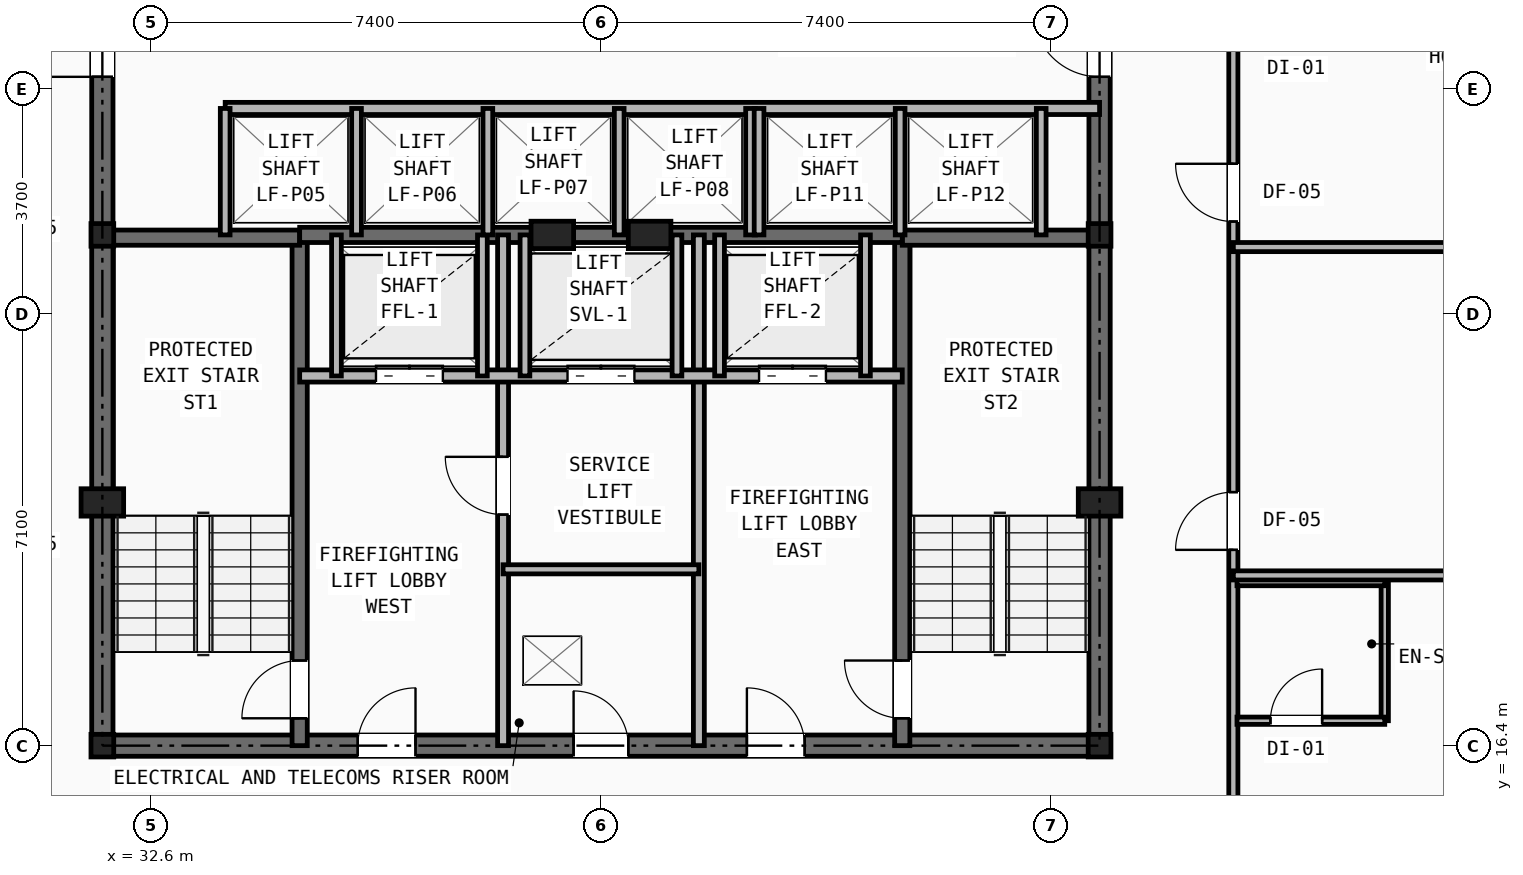
"""IFC4 building model, lengths in metres.
Left out: names, types, materials, properties, quantities, classifications, styles, units other than length and angle.
Written with IfcOpenShell. Run it as: python <this file> out.ifc"""

import sys

from ifc_helpers import new_model, si_unit, direction, frame, frame_2d, origin, origin_2d, place, context, subcontext, project, spatial, rectangle, i_section, extrude, element, fill, save


model = new_model("IFC4")
c1 = context("Model", 3, precision=1e-05, world=origin(), true_north=direction((0.0, 1.0)))
c2 = subcontext(c1, "Body", "Model", "MODEL_VIEW")
j1 = project(units=[si_unit("LENGTHUNIT", "METRE"), si_unit("PLANEANGLEUNIT", "RADIAN")], contexts=[c1])
p1 = place(None, origin())
s1 = spatial("IfcSite", under=j1, at=p1, CompositionType="ELEMENT")
p2 = place(p1, origin())
s2 = spatial("IfcBuilding", under=s1, at=p2, CompositionType="ELEMENT")
p3 = place(p2, frame((0.0, 0.0, 102.2)))
s3 = spatial("IfcBuildingStorey", under=s2, at=p3, CompositionType="ELEMENT", Elevation=102.2)
for number, where, z_axis, x_axis in (
    (1, (31.8, 16.4, 0.0), (0.0, 0.0, 1.0), (1.0, 0.0, 0.0)),
    (2, (48.2, 16.4, 0.0), (0.0, 0.0, 1.0), (1.0, 0.0, 0.0)),
    (3, (31.8, 24.8, 0.0), (0.0, 0.0, 1.0), (1.0, 0.0, 0.0)),
    (4, (48.2, 24.8, 0.0), (0.0, 0.0, 1.0), (1.0, 0.0, 0.0)),
):
    element("IfcColumn", number, at=place(p3, frame(where, z_axis=z_axis, x_axis=x_axis)), inside=s3, PredefinedType="COLUMN", context=c2, shape_type="SweptSolid", body=[
        extrude(i_section(OverallWidth=0.374, OverallDepth=0.372, WebThickness=0.016, FlangeThickness=0.026, at=origin_2d()), origin(), (0.0, 0.0, 1.0), 3.2),
    ])
for number, where, z_axis, x_axis in (
    (5, (31.8, 20.4, 0.0), (0.0, 0.0, 1.0), (1.0, 0.0, 0.0)),
    (6, (48.2, 20.4, 0.0), (0.0, 0.0, 1.0), (1.0, 0.0, 0.0)),
    (7, (39.2, 24.8, 0.0), (0.0, 0.0, 1.0), (1.0, 0.0, 0.0)),
    (8, (40.8, 24.8, 0.0), (0.0, 0.0, 1.0), (1.0, 0.0, 0.0)),
):
    element("IfcColumn", number, at=place(p3, frame(where, z_axis=z_axis, x_axis=x_axis)), inside=s3, PredefinedType="PILASTER", context=c2, shape_type="SweptSolid", body=[
        extrude(rectangle(XDim=0.7, YDim=0.45, at=origin_2d()), origin(), (0.0, 0.0, 1.0), 3.2),
    ])
p4 = place(p3, frame((31.8, 16.4, 0.0), z_axis=(0.0, 0.0, 1.0), x_axis=(1.0, 0.0, 0.0)))
e9 = element("IfcWall", 9, at=p4, inside=s3, PredefinedType="SHEAR", context=c2, shape_type="SweptSolid", body=[
    extrude(rectangle(XDim=16.4, YDim=0.35, at=frame_2d((8.2, 0.0))), origin(), (0.0, 0.0, 1.0), 2.97),
])
p5 = place(p4, frame((7.75, 0.0, 0.0)))
e10 = element("IfcOpeningElement", 10, at=p5, cuts=e9, PredefinedType="OPENING", context=c2, shape_type="SweptSolid", body=[
    extrude(rectangle(XDim=0.9, YDim=2.1, at=frame_2d((0.45, 1.05))), frame((0.0, 0.185, 0.0), z_axis=(0.0, -1.0, 0.0), x_axis=(1.0, 0.0, 0.0)), (0.0, 0.0, 1.0), 0.37),
])
p6 = place(p4, frame((4.2, 0.0, 0.0)))
e11 = element("IfcOpeningElement", 11, at=p6, cuts=e9, PredefinedType="OPENING", context=c2, shape_type="SweptSolid", body=[
    extrude(rectangle(XDim=0.95, YDim=2.1, at=frame_2d((0.475, 1.05))), frame((0.0, 0.185, 0.0), z_axis=(0.0, -1.0, 0.0), x_axis=(1.0, 0.0, 0.0)), (0.0, 0.0, 1.0), 0.37),
])
p7 = place(p4, frame((10.6, 0.0, 0.0)))
e12 = element("IfcOpeningElement", 12, at=p7, cuts=e9, PredefinedType="OPENING", context=c2, shape_type="SweptSolid", body=[
    extrude(rectangle(XDim=0.95, YDim=2.1, at=frame_2d((0.475, 1.05))), frame((0.0, 0.185, 0.0), z_axis=(0.0, -1.0, 0.0), x_axis=(1.0, 0.0, 0.0)), (0.0, 0.0, 1.0), 0.37),
])
p8 = place(p3, frame((31.8, 16.4, 0.0), z_axis=(0.0, 0.0, 1.0), x_axis=(0.0, 1.0, 0.0)))
e13 = element("IfcWall", 13, at=p8, inside=s3, PredefinedType="SHEAR", context=c2, shape_type="SweptSolid", body=[
    extrude(rectangle(XDim=14.8, YDim=0.35, at=frame_2d((7.4, 0.0))), origin(), (0.0, 0.0, 1.0), 2.97),
])
p9 = place(p8, frame((11.0, 0.0, 0.0)))
e14 = element("IfcOpeningElement", 14, at=p9, cuts=e13, PredefinedType="OPENING", context=c2, shape_type="SweptSolid", body=[
    extrude(rectangle(XDim=1.1, YDim=2.15, at=frame_2d((0.55, 1.075))), frame((0.0, 0.185, 0.0), z_axis=(0.0, -1.0, 0.0), x_axis=(1.0, 0.0, 0.0)), (0.0, 0.0, 1.0), 0.37),
])
p10 = place(p3, frame((48.2, 16.4, 0.0), z_axis=(0.0, 0.0, 1.0), x_axis=(0.0, 1.0, 0.0)))
e15 = element("IfcWall", 15, at=p10, inside=s3, PredefinedType="SHEAR", context=c2, shape_type="SweptSolid", body=[
    extrude(rectangle(XDim=14.8, YDim=0.35, at=frame_2d((7.4, 0.0))), origin(), (0.0, 0.0, 1.0), 2.97),
])
p11 = place(p10, frame((11.0, 0.0, 0.0)))
e16 = element("IfcOpeningElement", 16, at=p11, cuts=e15, PredefinedType="OPENING", context=c2, shape_type="SweptSolid", body=[
    extrude(rectangle(XDim=1.1, YDim=2.15, at=frame_2d((0.55, 1.075))), frame((0.0, 0.185, 0.0), z_axis=(0.0, -1.0, 0.0), x_axis=(1.0, 0.0, 0.0)), (0.0, 0.0, 1.0), 0.37),
])
p12 = place(p3, frame((35.045, 16.4, 0.0), z_axis=(0.0, 0.0, 1.0), x_axis=(0.0, 1.0, 0.0)))
e17 = element("IfcWall", 17, at=p12, inside=s3, PredefinedType="SHEAR", context=c2, shape_type="SweptSolid", body=[
    extrude(rectangle(XDim=8.4, YDim=0.25, at=frame_2d((4.2, 0.0))), origin(), (0.0, 0.0, 1.0), 2.97),
])
p13 = place(p12, frame((0.45, 0.0, 0.0)))
e18 = element("IfcOpeningElement", 18, at=p13, cuts=e17, PredefinedType="OPENING", context=c2, shape_type="SweptSolid", body=[
    extrude(rectangle(XDim=0.95, YDim=2.1, at=frame_2d((0.475, 1.05))), frame((0.0, 0.135, 0.0), z_axis=(0.0, -1.0, 0.0), x_axis=(1.0, 0.0, 0.0)), (0.0, 0.0, 1.0), 0.27),
])
p14 = place(p3, frame((31.8, 24.755, 0.0), z_axis=(0.0, 0.0, 1.0), x_axis=(1.0, 0.0, 0.0)))
e19 = element("IfcWall", 19, at=p14, inside=s3, PredefinedType="SHEAR", context=c2, shape_type="SweptSolid", body=[
    extrude(rectangle(XDim=3.245, YDim=0.25, at=frame_2d((1.623, 0.0))), origin(), (0.0, 0.0, 1.0), 2.97),
])
p15 = place(p3, frame((44.955, 16.4, 0.0), z_axis=(0.0, 0.0, 1.0), x_axis=(0.0, 1.0, 0.0)))
e20 = element("IfcWall", 20, at=p15, inside=s3, PredefinedType="SHEAR", context=c2, shape_type="SweptSolid", body=[
    extrude(rectangle(XDim=8.4, YDim=0.25, at=frame_2d((4.2, 0.0))), origin(), (0.0, 0.0, 1.0), 2.97),
])
p16 = place(p15, frame((0.45, 0.0, 0.0)))
e21 = element("IfcOpeningElement", 21, at=p16, cuts=e20, PredefinedType="OPENING", context=c2, shape_type="SweptSolid", body=[
    extrude(rectangle(XDim=0.95, YDim=2.1, at=frame_2d((0.475, 1.05))), frame((0.0, 0.135, 0.0), z_axis=(0.0, -1.0, 0.0), x_axis=(1.0, 0.0, 0.0)), (0.0, 0.0, 1.0), 0.27),
])
p17 = place(p3, frame((44.955, 24.755, 0.0), z_axis=(0.0, 0.0, 1.0), x_axis=(1.0, 0.0, 0.0)))
e22 = element("IfcWall", 22, at=p17, inside=s3, PredefinedType="SHEAR", context=c2, shape_type="SweptSolid", body=[
    extrude(rectangle(XDim=3.245, YDim=0.25, at=frame_2d((1.623, 0.0))), origin(), (0.0, 0.0, 1.0), 2.97),
])
p18 = place(p3, frame((35.045, 24.8, 0.0), z_axis=(0.0, 0.0, 1.0), x_axis=(1.0, 0.0, 0.0)))
e23 = element("IfcWall", 23, at=p18, inside=s3, PredefinedType="SHEAR", context=c2, shape_type="SweptSolid", body=[
    extrude(rectangle(XDim=9.91, YDim=0.25, at=frame_2d((4.955, 0.0))), origin(), (0.0, 0.0, 1.0), 2.97),
])
p19 = place(p3, frame((38.39, 16.4, 0.0), z_axis=(0.0, 0.0, 1.0), x_axis=(0.0, 1.0, 0.0)))
e24 = element("IfcWall", 24, at=p19, inside=s3, PredefinedType="PARTITIONING", context=c2, shape_type="SweptSolid", body=[
    extrude(rectangle(XDim=8.4, YDim=0.18, at=frame_2d((4.2, 0.0))), origin(), (0.0, 0.0, 1.0), 2.421),
])
p20 = place(p19, frame((3.8, 0.0, 0.0)))
e25 = element("IfcOpeningElement", 25, at=p20, cuts=e24, PredefinedType="OPENING", context=c2, shape_type="SweptSolid", body=[
    extrude(rectangle(XDim=0.95, YDim=2.1, at=frame_2d((0.475, 1.05))), frame((0.0, 0.1, 0.0), z_axis=(0.0, -1.0, 0.0), x_axis=(1.0, 0.0, 0.0)), (0.0, 0.0, 1.0), 0.2),
])
p21 = place(p3, frame((41.61, 16.4, 0.0), z_axis=(0.0, 0.0, 1.0), x_axis=(0.0, 1.0, 0.0)))
e26 = element("IfcWall", 26, at=p21, inside=s3, PredefinedType="PARTITIONING", context=c2, shape_type="SweptSolid", body=[
    extrude(rectangle(XDim=8.4, YDim=0.18, at=frame_2d((4.2, 0.0))), origin(), (0.0, 0.0, 1.0), 2.421),
])
p22 = place(p3, frame((35.045, 22.48, 0.0), z_axis=(0.0, 0.0, 1.0), x_axis=(1.0, 0.0, 0.0)))
e27 = element("IfcWall", 27, at=p22, inside=s3, PredefinedType="SOLIDWALL", context=c2, shape_type="SweptSolid", body=[
    extrude(rectangle(XDim=9.91, YDim=0.2, at=frame_2d((4.955, 0.0))), origin(), (0.0, 0.0, 1.0), 2.97),
])
p23 = place(p22, frame((1.255, 0.0, 0.0)))
e28 = element("IfcOpeningElement", 28, at=p23, cuts=e27, PredefinedType="OPENING", context=c2, shape_type="SweptSolid", body=[
    extrude(rectangle(XDim=1.1, YDim=2.15, at=frame_2d((0.55, 1.075))), frame((0.0, 0.11, 0.0), z_axis=(0.0, -1.0, 0.0), x_axis=(1.0, 0.0, 0.0)), (0.0, 0.0, 1.0), 0.22),
])
p24 = place(p22, frame((7.555, 0.0, 0.0)))
e29 = element("IfcOpeningElement", 29, at=p24, cuts=e27, PredefinedType="OPENING", context=c2, shape_type="SweptSolid", body=[
    extrude(rectangle(XDim=1.1, YDim=2.15, at=frame_2d((0.55, 1.075))), frame((0.0, 0.11, 0.0), z_axis=(0.0, -1.0, 0.0), x_axis=(1.0, 0.0, 0.0)), (0.0, 0.0, 1.0), 0.22),
])
p25 = place(p22, frame((4.405, 0.0, 0.0)))
e30 = element("IfcOpeningElement", 30, at=p25, cuts=e27, PredefinedType="OPENING", context=c2, shape_type="SweptSolid", body=[
    extrude(rectangle(XDim=1.1, YDim=2.15, at=frame_2d((0.55, 1.075))), frame((0.0, 0.11, 0.0), z_axis=(0.0, -1.0, 0.0), x_axis=(1.0, 0.0, 0.0)), (0.0, 0.0, 1.0), 0.22),
])
p26 = place(p3, frame((38.39, 19.3, 0.0), z_axis=(0.0, 0.0, 1.0), x_axis=(1.0, 0.0, 0.0)))
e31 = element("IfcWall", 31, at=p26, inside=s3, PredefinedType="PARTITIONING", context=c2, shape_type="SweptSolid", body=[
    extrude(rectangle(XDim=3.22, YDim=0.15, at=frame_2d((1.61, 0.0))), origin(), (0.0, 0.0, 1.0), 2.97),
])
for number, where, z_axis, x_axis in (
    (32, (35.65, 22.48, 0.0), (0.0, 0.0, 1.0), (0.0, 1.0, 0.0)),
    (33, (38.05, 22.48, 0.0), (0.0, 0.0, 1.0), (0.0, 1.0, 0.0)),
    (34, (41.95, 22.48, 0.0), (0.0, 0.0, 1.0), (0.0, 1.0, 0.0)),
    (35, (44.35, 22.48, 0.0), (0.0, 0.0, 1.0), (0.0, 1.0, 0.0)),
    (36, (38.75, 22.48, 0.0), (0.0, 0.0, 1.0), (0.0, 1.0, 0.0)),
    (37, (41.25, 22.48, 0.0), (0.0, 0.0, 1.0), (0.0, 1.0, 0.0)),
):
    element("IfcWall", number, at=place(p3, frame(where, z_axis=z_axis, x_axis=x_axis)), inside=s3, PredefinedType="SOLIDWALL", context=c2, shape_type="SweptSolid", body=[
        extrude(rectangle(XDim=2.32, YDim=0.16, at=frame_2d((1.16, 0.0))), origin(), (0.0, 0.0, 1.0), 2.97),
    ])
p27 = place(p3, frame((33.82, 26.88, 0.0), z_axis=(0.0, 0.0, 1.0), x_axis=(1.0, 0.0, 0.0)))
e38 = element("IfcWall", 38, at=p27, inside=s3, PredefinedType="SOLIDWALL", context=c2, shape_type="SweptSolid", body=[
    extrude(rectangle(XDim=14.38, YDim=0.2, at=frame_2d((7.19, 0.0))), origin(), (0.0, 0.0, 1.0), 2.421),
])
for number, where, z_axis, x_axis in (
    (39, (33.82, 24.8, 0.0), (0.0, 0.0, 1.0), (0.0, 1.0, 0.0)),
    (40, (35.98, 24.8, 0.0), (0.0, 0.0, 1.0), (0.0, 1.0, 0.0)),
    (41, (38.14, 24.8, 0.0), (0.0, 0.0, 1.0), (0.0, 1.0, 0.0)),
    (42, (40.3, 24.8, 0.0), (0.0, 0.0, 1.0), (0.0, 1.0, 0.0)),
    (43, (42.46, 24.8, 0.0), (0.0, 0.0, 1.0), (0.0, 1.0, 0.0)),
    (44, (42.6, 24.8, 0.0), (0.0, 0.0, 1.0), (0.0, 1.0, 0.0)),
    (45, (44.92, 24.8, 0.0), (0.0, 0.0, 1.0), (0.0, 1.0, 0.0)),
    (46, (47.24, 24.8, 0.0), (0.0, 0.0, 1.0), (0.0, 1.0, 0.0)),
):
    element("IfcWall", number, at=place(p3, frame(where, z_axis=z_axis, x_axis=x_axis)), inside=s3, PredefinedType="SOLIDWALL", context=c2, shape_type="SweptSolid", body=[
        extrude(rectangle(XDim=2.08, YDim=0.16, at=frame_2d((1.04, 0.0))), origin(), (0.0, 0.0, 1.0), 2.97),
    ])
p28 = place(p3, frame((50.4, 14.1, 0.0), z_axis=(0.0, 0.0, 1.0), x_axis=(0.0, 1.0, 0.0)))
e47 = element("IfcWall", 47, at=p28, inside=s3, PredefinedType="PARTITIONING", context=c2, shape_type="SweptSolid", body=[
    extrude(rectangle(XDim=21.9, YDim=0.15, at=frame_2d((10.95, 0.0))), origin(), (0.0, 0.0, 1.0), 2.421),
])
p29 = place(p28, frame((0.42, 0.0, 0.0)))
e48 = element("IfcOpeningElement", 48, at=p29, cuts=e47, PredefinedType="OPENING", context=c2, shape_type="SweptSolid", body=[
    extrude(rectangle(XDim=0.95, YDim=2.1, at=frame_2d((0.475, 1.05))), frame((0.0, 0.085, 0.0), z_axis=(0.0, -1.0, 0.0), x_axis=(1.0, 0.0, 0.0)), (0.0, 0.0, 1.0), 0.17),
])
p30 = place(p28, frame((5.52, 0.0, 0.0)))
e49 = element("IfcOpeningElement", 49, at=p30, cuts=e47, PredefinedType="OPENING", context=c2, shape_type="SweptSolid", body=[
    extrude(rectangle(XDim=0.95, YDim=2.1, at=frame_2d((0.475, 1.05))), frame((0.0, 0.085, 0.0), z_axis=(0.0, -1.0, 0.0), x_axis=(1.0, 0.0, 0.0)), (0.0, 0.0, 1.0), 0.17),
])
p31 = place(p28, frame((10.92, 0.0, 0.0)))
e50 = element("IfcOpeningElement", 50, at=p31, cuts=e47, PredefinedType="OPENING", context=c2, shape_type="SweptSolid", body=[
    extrude(rectangle(XDim=0.95, YDim=2.1, at=frame_2d((0.475, 1.05))), frame((0.0, 0.085, 0.0), z_axis=(0.0, -1.0, 0.0), x_axis=(1.0, 0.0, 0.0)), (0.0, 0.0, 1.0), 0.17),
])
p32 = place(p28, frame((16.72, 0.0, 0.0)))
e51 = element("IfcOpeningElement", 51, at=p32, cuts=e47, PredefinedType="OPENING", context=c2, shape_type="SweptSolid", body=[
    extrude(rectangle(XDim=0.95, YDim=2.1, at=frame_2d((0.475, 1.05))), frame((0.0, 0.085, 0.0), z_axis=(0.0, -1.0, 0.0), x_axis=(1.0, 0.0, 0.0)), (0.0, 0.0, 1.0), 0.17),
])
p33 = place(p3, frame((52.89, 16.81, 0.0), z_axis=(0.0, 0.0, 1.0), x_axis=(0.0, 1.0, 0.0)))
e52 = element("IfcWall", 52, at=p33, inside=s3, PredefinedType="PARTITIONING", context=c2, shape_type="SweptSolid", body=[
    extrude(rectangle(XDim=2.28, YDim=0.12, at=frame_2d((1.14, 0.0))), origin(), (0.0, 0.0, 1.0), 2.97),
])
p34 = place(p3, frame((50.46, 16.81, 0.0), z_axis=(0.0, 0.0, 1.0), x_axis=(1.0, 0.0, 0.0)))
e53 = element("IfcWall", 53, at=p34, inside=s3, PredefinedType="PARTITIONING", context=c2, shape_type="SweptSolid", body=[
    extrude(rectangle(XDim=2.43, YDim=0.12, at=frame_2d((1.215, 0.0))), origin(), (0.0, 0.0, 1.0), 2.97),
])
p35 = place(p34, frame((0.55, 0.0, 0.0)))
e54 = element("IfcOpeningElement", 54, at=p35, cuts=e53, PredefinedType="OPENING", context=c2, shape_type="SweptSolid", body=[
    extrude(rectangle(XDim=0.85, YDim=2.05, at=frame_2d((0.425, 1.025))), frame((0.0, 0.07, 0.0), z_axis=(0.0, -1.0, 0.0), x_axis=(1.0, 0.0, 0.0)), (0.0, 0.0, 1.0), 0.14),
])
p36 = place(p3, frame((50.46, 19.09, 0.0), z_axis=(0.0, 0.0, 1.0), x_axis=(1.0, 0.0, 0.0)))
e55 = element("IfcWall", 55, at=p36, inside=s3, PredefinedType="PARTITIONING", context=c2, shape_type="SweptSolid", body=[
    extrude(rectangle(XDim=2.43, YDim=0.12, at=frame_2d((1.215, 0.0))), origin(), (0.0, 0.0, 1.0), 2.97),
])
p37 = place(p3, frame((50.4, 19.2, 0.0), z_axis=(0.0, 0.0, 1.0), x_axis=(1.0, 0.0, 0.0)))
e56 = element("IfcWall", 56, at=p37, inside=s3, PredefinedType="PARTITIONING", context=c2, shape_type="SweptSolid", body=[
    extrude(rectangle(XDim=14.218, YDim=0.15, at=frame_2d((7.109, 0.0))), origin(), (0.0, 0.0, 1.0), 2.258),
])
p38 = place(p3, frame((50.4, 24.6, 0.0), z_axis=(0.0, 0.0, 1.0), x_axis=(1.0, 0.0, 0.0)))
e57 = element("IfcWall", 57, at=p38, inside=s3, PredefinedType="PARTITIONING", context=c2, shape_type="SweptSolid", body=[
    extrude(rectangle(XDim=11.295, YDim=0.15, at=frame_2d((5.648, 0.0))), origin(), (0.0, 0.0, 1.0), 2.258),
])
p39 = place(p5, origin())
e58 = element("IfcDoor", 58, at=p39, inside=s3, OperationType="SINGLE_SWING_LEFT", PredefinedType="DOOR", context=c2, shape_type="SweptSolid", body=[
    extrude(rectangle(XDim=0.9, YDim=2.1, at=frame_2d((0.45, 1.05))), frame((0.0, 0.025, 0.0), z_axis=(0.0, -1.0, 0.0), x_axis=(1.0, 0.0, 0.0)), (0.0, 0.0, 1.0), 0.05),
])
fill(e10, e58)
p40 = place(p20, origin())
e59 = element("IfcDoor", 59, at=p40, inside=s3, OperationType="SINGLE_SWING_RIGHT", PredefinedType="DOOR", context=c2, shape_type="SweptSolid", body=[
    extrude(rectangle(XDim=0.95, YDim=2.1, at=frame_2d((0.475, 1.05))), frame((0.0, 0.025, 0.0), z_axis=(0.0, -1.0, 0.0), x_axis=(1.0, 0.0, 0.0)), (0.0, 0.0, 1.0), 0.05),
])
fill(e25, e59)
p41 = place(p13, origin())
e60 = element("IfcDoor", 60, at=p41, inside=s3, OperationType="SINGLE_SWING_LEFT", PredefinedType="DOOR", context=c2, shape_type="SweptSolid", body=[
    extrude(rectangle(XDim=0.95, YDim=2.1, at=frame_2d((0.475, 1.05))), frame((0.0, 0.025, 0.0), z_axis=(0.0, -1.0, 0.0), x_axis=(1.0, 0.0, 0.0)), (0.0, 0.0, 1.0), 0.05),
])
fill(e18, e60)
p42 = place(p16, origin())
e61 = element("IfcDoor", 61, at=p42, inside=s3, OperationType="SINGLE_SWING_RIGHT", PredefinedType="DOOR", context=c2, shape_type="SweptSolid", body=[
    extrude(rectangle(XDim=0.95, YDim=2.1, at=frame_2d((0.475, 1.05))), frame((0.0, 0.025, 0.0), z_axis=(0.0, -1.0, 0.0), x_axis=(1.0, 0.0, 0.0)), (0.0, 0.0, 1.0), 0.05),
])
fill(e21, e61)
p43 = place(p6, origin())
e62 = element("IfcDoor", 62, at=p43, inside=s3, OperationType="SINGLE_SWING_RIGHT", PredefinedType="DOOR", context=c2, shape_type="SweptSolid", body=[
    extrude(rectangle(XDim=0.95, YDim=2.1, at=frame_2d((0.475, 1.05))), frame((0.0, 0.025, 0.0), z_axis=(0.0, -1.0, 0.0), x_axis=(1.0, 0.0, 0.0)), (0.0, 0.0, 1.0), 0.05),
])
fill(e11, e62)
p44 = place(p7, origin())
e63 = element("IfcDoor", 63, at=p44, inside=s3, OperationType="SINGLE_SWING_LEFT", PredefinedType="DOOR", context=c2, shape_type="SweptSolid", body=[
    extrude(rectangle(XDim=0.95, YDim=2.1, at=frame_2d((0.475, 1.05))), frame((0.0, 0.025, 0.0), z_axis=(0.0, -1.0, 0.0), x_axis=(1.0, 0.0, 0.0)), (0.0, 0.0, 1.0), 0.05),
])
fill(e12, e63)
p45 = place(p23, origin())
e64 = element("IfcDoor", 64, at=p45, inside=s3, OperationType="DOUBLE_DOOR_SLIDING", PredefinedType="DOOR", context=c2, shape_type="SweptSolid", body=[
    extrude(rectangle(XDim=1.1, YDim=2.15, at=frame_2d((0.55, 1.075))), frame((0.0, 0.025, 0.0), z_axis=(0.0, -1.0, 0.0), x_axis=(1.0, 0.0, 0.0)), (0.0, 0.0, 1.0), 0.05),
])
fill(e28, e64)
p46 = place(p24, origin())
e65 = element("IfcDoor", 65, at=p46, inside=s3, OperationType="DOUBLE_DOOR_SLIDING", PredefinedType="DOOR", context=c2, shape_type="SweptSolid", body=[
    extrude(rectangle(XDim=1.1, YDim=2.15, at=frame_2d((0.55, 1.075))), frame((0.0, 0.025, 0.0), z_axis=(0.0, -1.0, 0.0), x_axis=(1.0, 0.0, 0.0)), (0.0, 0.0, 1.0), 0.05),
])
fill(e29, e65)
p47 = place(p25, origin())
e66 = element("IfcDoor", 66, at=p47, inside=s3, OperationType="DOUBLE_DOOR_SLIDING", PredefinedType="DOOR", context=c2, shape_type="SweptSolid", body=[
    extrude(rectangle(XDim=1.1, YDim=2.15, at=frame_2d((0.55, 1.075))), frame((0.0, 0.025, 0.0), z_axis=(0.0, -1.0, 0.0), x_axis=(1.0, 0.0, 0.0)), (0.0, 0.0, 1.0), 0.05),
])
fill(e30, e66)
p48 = place(p9, origin())
e67 = element("IfcDoor", 67, at=p48, inside=s3, OperationType="SINGLE_SWING_LEFT", PredefinedType="DOOR", context=c2, shape_type="SweptSolid", body=[
    extrude(rectangle(XDim=1.1, YDim=2.15, at=frame_2d((0.55, 1.075))), frame((0.0, 0.025, 0.0), z_axis=(0.0, -1.0, 0.0), x_axis=(1.0, 0.0, 0.0)), (0.0, 0.0, 1.0), 0.05),
])
fill(e14, e67)
p49 = place(p11, origin())
e68 = element("IfcDoor", 68, at=p49, inside=s3, OperationType="SINGLE_SWING_RIGHT", PredefinedType="DOOR", context=c2, shape_type="SweptSolid", body=[
    extrude(rectangle(XDim=1.1, YDim=2.15, at=frame_2d((0.55, 1.075))), frame((0.0, 0.025, 0.0), z_axis=(0.0, -1.0, 0.0), x_axis=(1.0, 0.0, 0.0)), (0.0, 0.0, 1.0), 0.05),
])
fill(e16, e68)
p50 = place(p35, origin())
e69 = element("IfcDoor", 69, at=p50, inside=s3, OperationType="SINGLE_SWING_RIGHT", PredefinedType="DOOR", context=c2, shape_type="SweptSolid", body=[
    extrude(rectangle(XDim=0.85, YDim=2.05, at=frame_2d((0.425, 1.025))), frame((0.0, 0.025, 0.0), z_axis=(0.0, -1.0, 0.0), x_axis=(1.0, 0.0, 0.0)), (0.0, 0.0, 1.0), 0.05),
])
fill(e54, e69)
p51 = place(p30, origin())
e70 = element("IfcDoor", 70, at=p51, inside=s3, OperationType="SINGLE_SWING_LEFT", PredefinedType="DOOR", context=c2, shape_type="SweptSolid", body=[
    extrude(rectangle(XDim=0.95, YDim=2.1, at=frame_2d((0.475, 1.05))), frame((0.0, 0.025, 0.0), z_axis=(0.0, -1.0, 0.0), x_axis=(1.0, 0.0, 0.0)), (0.0, 0.0, 1.0), 0.05),
])
fill(e49, e70)
p52 = place(p31, origin())
e71 = element("IfcDoor", 71, at=p52, inside=s3, OperationType="SINGLE_SWING_RIGHT", PredefinedType="DOOR", context=c2, shape_type="SweptSolid", body=[
    extrude(rectangle(XDim=0.95, YDim=2.1, at=frame_2d((0.475, 1.05))), frame((0.0, 0.025, 0.0), z_axis=(0.0, -1.0, 0.0), x_axis=(1.0, 0.0, 0.0)), (0.0, 0.0, 1.0), 0.05),
])
fill(e50, e71)
save(model, sys.argv[1])
